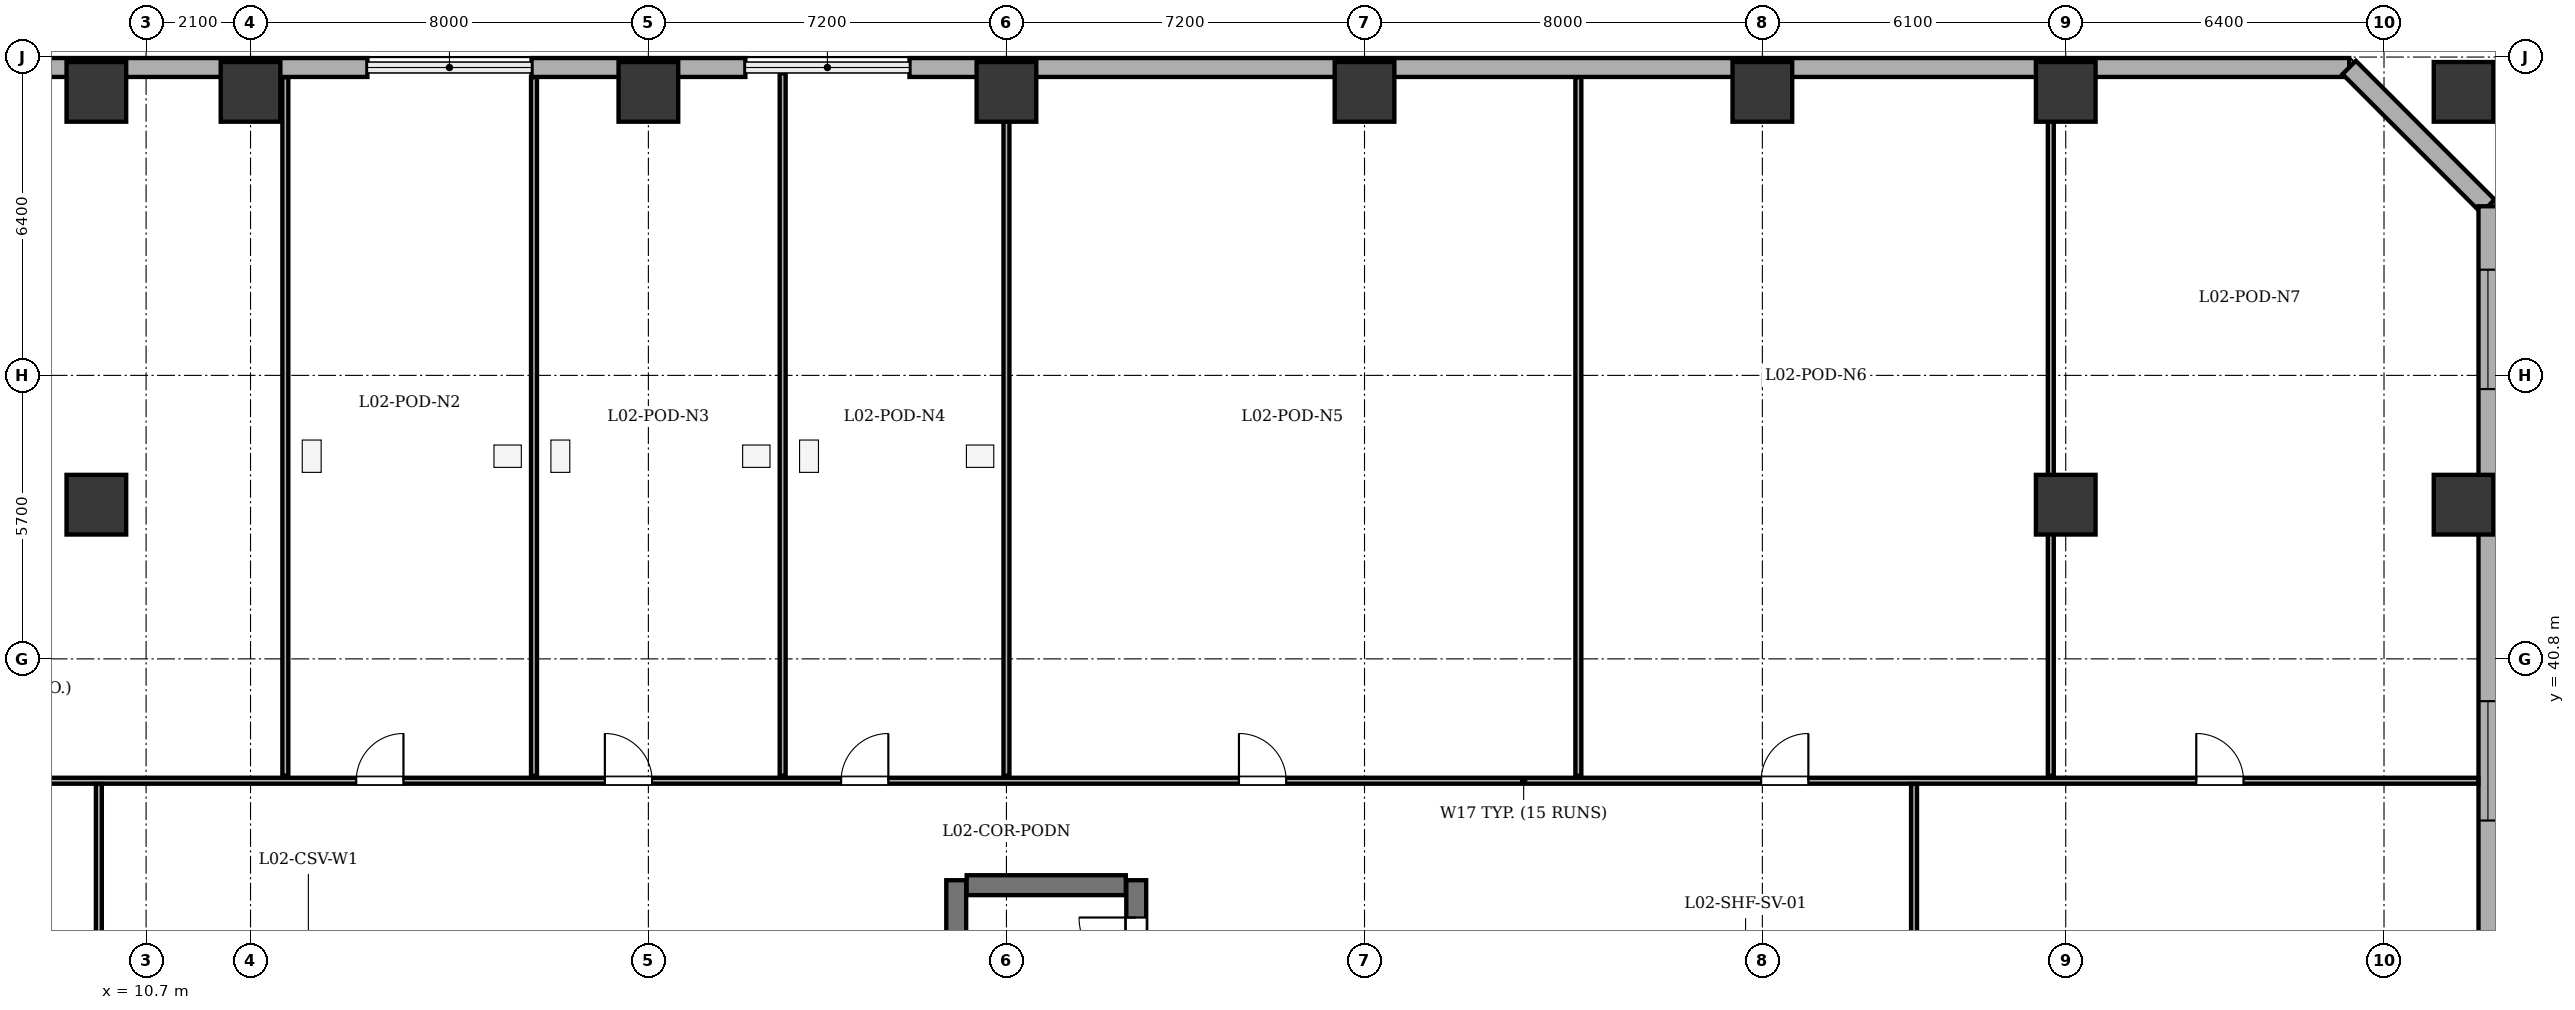
"""IFC4 building model, lengths in metres.
Left out: names, types, materials, properties, quantities, classifications, styles, units other than length and angle.
Written with IfcOpenShell. Run it as: python <this file> out.ifc"""

import sys

from ifc_helpers import new_model, si_unit, direction, frame, frame_2d, origin, origin_2d, place, context, subcontext, project, spatial, rectangle, extrude, element, fill, save


model = new_model("IFC4")
c1 = context("Model", 3, precision=1e-05, world=origin(), true_north=direction((0.0, 1.0)))
c2 = subcontext(c1, "Body", "Model", "MODEL_VIEW")
j1 = project(units=[si_unit("LENGTHUNIT", "METRE"), si_unit("PLANEANGLEUNIT", "RADIAN")], contexts=[c1])
p1 = place(None, origin())
s1 = spatial("IfcSite", under=j1, at=p1, CompositionType="ELEMENT")
p2 = place(p1, origin())
s2 = spatial("IfcBuilding", under=s1, at=p2, CompositionType="ELEMENT")
p3 = place(p2, frame((0.0, 0.0, 9.9)))
s3 = spatial("IfcBuildingStorey", under=s2, at=p3, CompositionType="ELEMENT", Elevation=9.9)
for number, where, z_axis, x_axis in (
    (1, (9.7, 52.2, 0.0), (0.0, 0.0, 1.0), (1.0, 0.0, 0.0)),
    (2, (12.8, 52.2, 0.0), (0.0, 0.0, 1.0), (1.0, 0.0, 0.0)),
    (3, (20.8, 52.2, 0.0), (0.0, 0.0, 1.0), (1.0, 0.0, 0.0)),
    (4, (28.0, 52.2, 0.0), (0.0, 0.0, 1.0), (1.0, 0.0, 0.0)),
    (5, (35.2, 52.2, 0.0), (0.0, 0.0, 1.0), (1.0, 0.0, 0.0)),
    (6, (43.2, 52.2, 0.0), (0.0, 0.0, 1.0), (1.0, 0.0, 0.0)),
    (7, (49.3, 52.2, 0.0), (0.0, 0.0, 1.0), (1.0, 0.0, 0.0)),
    (8, (57.3, 52.2, 0.0), (0.0, 0.0, 1.0), (1.0, 0.0, 0.0)),
    (9, (57.3, 43.9, 0.0), (0.0, 0.0, 1.0), (1.0, 0.0, 0.0)),
    (10, (9.7, 43.9, 0.0), (0.0, 0.0, 1.0), (1.0, 0.0, 0.0)),
    (11, (49.3, 43.9, 0.0), (0.0, 0.0, 1.0), (1.0, 0.0, 0.0)),
):
    element("IfcColumn", number, at=place(p3, frame(where, z_axis=z_axis, x_axis=x_axis)), inside=s3, PredefinedType="COLUMN", context=c2, shape_type="SweptSolid", body=[
        extrude(rectangle(XDim=1.2, YDim=1.2, at=origin_2d()), origin(), (0.0, 0.0, 1.0), 4.5),
    ])
p4 = place(p3, frame((5.4, 52.69, 0.0), z_axis=(0.0, 0.0, 1.0), x_axis=(1.0, 0.0, 0.0)))
e12 = element("IfcWall", 12, at=p4, inside=s3, PredefinedType="STANDARD", context=c2, shape_type="SweptSolid", body=[
    extrude(rectangle(XDim=9.75, YDim=0.38, at=frame_2d((4.875, 0.0))), origin(), (0.0, 0.0, 1.0), 4.18),
])
p5 = place(p3, frame((18.45, 52.69, 0.0), z_axis=(0.0, 0.0, 1.0), x_axis=(1.0, 0.0, 0.0)))
e13 = element("IfcWall", 13, at=p5, inside=s3, PredefinedType="STANDARD", context=c2, shape_type="SweptSolid", body=[
    extrude(rectangle(XDim=4.3, YDim=0.38, at=frame_2d((2.15, 0.0))), origin(), (0.0, 0.0, 1.0), 4.18),
])
p6 = place(p3, frame((26.05, 52.69, 0.0), z_axis=(0.0, 0.0, 1.0), x_axis=(1.0, 0.0, 0.0)))
e14 = element("IfcWall", 14, at=p6, inside=s3, PredefinedType="STANDARD", context=c2, shape_type="SweptSolid", body=[
    extrude(rectangle(XDim=28.95, YDim=0.38, at=frame_2d((14.475, 0.0))), origin(), (0.0, 0.0, 1.0), 4.18),
])
p7 = place(p3, frame((55.0, 52.69, 0.0), z_axis=(0.0, 0.0, 1.0), x_axis=(0.707106781187, -0.707106781187, 0.0)))
e15 = element("IfcWall", 15, at=p7, inside=s3, PredefinedType="STANDARD", context=c2, shape_type="SweptSolid", body=[
    extrude(rectangle(XDim=3.946, YDim=0.38, at=frame_2d((1.973, 0.0))), origin(), (0.0, 0.0, 1.0), 4.18),
])
p8 = place(p3, frame((57.79, 49.9, 0.0), z_axis=(0.0, 0.0, 1.0), x_axis=(0.0, -1.0, 0.0)))
e16 = element("IfcWall", 16, at=p8, inside=s3, PredefinedType="STANDARD", context=c2, shape_type="SweptSolid", body=[
    extrude(rectangle(XDim=45.4, YDim=0.38, at=frame_2d((22.7, 0.0))), origin(), (0.0, 0.0, 1.0), 4.18),
])
p9 = place(p8, frame((1.275, 0.0, 0.75)))
e17 = element("IfcOpeningElement", 17, at=p9, cuts=e16, PredefinedType="OPENING", context=c2, shape_type="SweptSolid", body=[
    extrude(rectangle(XDim=2.4, YDim=2.1, at=frame_2d((1.2, 1.05))), frame((0.0, 0.2, 0.0), z_axis=(0.0, -1.0, 0.0), x_axis=(1.0, 0.0, 0.0)), (0.0, 0.0, 1.0), 0.4),
])
p10 = place(p8, frame((9.95, 0.0, 0.75)))
e18 = element("IfcOpeningElement", 18, at=p10, cuts=e16, PredefinedType="OPENING", context=c2, shape_type="SweptSolid", body=[
    extrude(rectangle(XDim=2.4, YDim=2.1, at=frame_2d((1.2, 1.05))), frame((0.0, 0.2, 0.0), z_axis=(0.0, -1.0, 0.0), x_axis=(1.0, 0.0, 0.0)), (0.0, 0.0, 1.0), 0.4),
])
p11 = place(p8, frame((18.3, 0.0, 0.75)))
e19 = element("IfcOpeningElement", 19, at=p11, cuts=e16, PredefinedType="OPENING", context=c2, shape_type="SweptSolid", body=[
    extrude(rectangle(XDim=2.4, YDim=2.1, at=frame_2d((1.2, 1.05))), frame((0.0, 0.2, 0.0), z_axis=(0.0, -1.0, 0.0), x_axis=(1.0, 0.0, 0.0)), (0.0, 0.0, 1.0), 0.4),
])
p12 = place(p8, frame((24.7, 0.0, 0.75)))
e20 = element("IfcOpeningElement", 20, at=p12, cuts=e16, PredefinedType="OPENING", context=c2, shape_type="SweptSolid", body=[
    extrude(rectangle(XDim=2.4, YDim=2.1, at=frame_2d((1.2, 1.05))), frame((0.0, 0.2, 0.0), z_axis=(0.0, -1.0, 0.0), x_axis=(1.0, 0.0, 0.0)), (0.0, 0.0, 1.0), 0.4),
])
p13 = place(p8, frame((33.05, 0.0, 0.75)))
e21 = element("IfcOpeningElement", 21, at=p13, cuts=e16, PredefinedType="OPENING", context=c2, shape_type="SweptSolid", body=[
    extrude(rectangle(XDim=2.4, YDim=2.1, at=frame_2d((1.2, 1.05))), frame((0.0, 0.2, 0.0), z_axis=(0.0, -1.0, 0.0), x_axis=(1.0, 0.0, 0.0)), (0.0, 0.0, 1.0), 0.4),
])
p14 = place(p8, frame((41.725, 0.0, 0.75)))
e22 = element("IfcOpeningElement", 22, at=p14, cuts=e16, PredefinedType="OPENING", context=c2, shape_type="SweptSolid", body=[
    extrude(rectangle(XDim=2.4, YDim=2.1, at=frame_2d((1.2, 1.05))), frame((0.0, 0.2, 0.0), z_axis=(0.0, -1.0, 0.0), x_axis=(1.0, 0.0, 0.0)), (0.0, 0.0, 1.0), 0.4),
])
p15 = place(p3, frame((26.99, 28.75, 0.0), z_axis=(0.0, 0.0, 1.0), x_axis=(0.0, 1.0, 0.0)))
e23 = element("IfcWall", 23, at=p15, inside=s3, PredefinedType="SHEAR", context=c2, shape_type="SweptSolid", body=[
    extrude(rectangle(XDim=7.6, YDim=0.4, at=frame_2d((3.8, 0.0))), origin(), (0.0, 0.0, 1.0), 4.18),
])
p16 = place(p3, frame((30.61, 28.75, 0.0), z_axis=(0.0, 0.0, 1.0), x_axis=(0.0, 1.0, 0.0)))
e24 = element("IfcWall", 24, at=p16, inside=s3, PredefinedType="SHEAR", context=c2, shape_type="SweptSolid", body=[
    extrude(rectangle(XDim=7.6, YDim=0.4, at=frame_2d((3.8, 0.0))), origin(), (0.0, 0.0, 1.0), 4.18),
])
p17 = place(p16, frame((5.7, 0.0, 0.0)))
e25 = element("IfcOpeningElement", 25, at=p17, cuts=e24, PredefinedType="OPENING", context=c2, shape_type="SweptSolid", body=[
    extrude(rectangle(XDim=1.15, YDim=2.15, at=frame_2d((0.575, 1.075))), frame((0.0, 0.21, 0.0), z_axis=(0.0, -1.0, 0.0), x_axis=(1.0, 0.0, 0.0)), (0.0, 0.0, 1.0), 0.42),
])
p18 = place(p3, frame((27.2, 36.25, 0.0), z_axis=(0.0, 0.0, 1.0), x_axis=(1.0, 0.0, 0.0)))
e26 = element("IfcWall", 26, at=p18, inside=s3, PredefinedType="SHEAR", context=c2, shape_type="SweptSolid", body=[
    extrude(rectangle(XDim=3.2, YDim=0.4, at=frame_2d((1.6, 0.0))), origin(), (0.0, 0.0, 1.0), 4.18),
])
p19 = place(p3, frame((2.805, 38.35, 0.0), z_axis=(0.0, 0.0, 1.0), x_axis=(1.0, 0.0, 0.0)))
e27 = element("IfcWall", 27, at=p19, inside=s3, PredefinedType="PARTITIONING", context=c2, shape_type="SweptSolid", body=[
    extrude(rectangle(XDim=54.79, YDim=0.12, at=frame_2d((27.395, 0.0))), origin(), (0.0, 0.0, 1.0), 4.18),
])
p20 = place(p19, frame((4.57, 0.0, 0.0)))
e28 = element("IfcOpeningElement", 28, at=p20, cuts=e27, PredefinedType="OPENING", context=c2, shape_type="SweptSolid", body=[
    extrude(rectangle(XDim=0.95, YDim=2.1, at=frame_2d((0.475, 1.05))), frame((0.0, 0.07, 0.0), z_axis=(0.0, -1.0, 0.0), x_axis=(1.0, 0.0, 0.0)), (0.0, 0.0, 1.0), 0.14),
])
p21 = place(p19, frame((12.12, 0.0, 0.0)))
e29 = element("IfcOpeningElement", 29, at=p21, cuts=e27, PredefinedType="OPENING", context=c2, shape_type="SweptSolid", body=[
    extrude(rectangle(XDim=0.95, YDim=2.1, at=frame_2d((0.475, 1.05))), frame((0.0, 0.07, 0.0), z_axis=(0.0, -1.0, 0.0), x_axis=(1.0, 0.0, 0.0)), (0.0, 0.0, 1.0), 0.14),
])
p22 = place(p19, frame((17.12, 0.0, 0.0)))
e30 = element("IfcOpeningElement", 30, at=p22, cuts=e27, PredefinedType="OPENING", context=c2, shape_type="SweptSolid", body=[
    extrude(rectangle(XDim=0.95, YDim=2.1, at=frame_2d((0.475, 1.05))), frame((0.0, 0.07, 0.0), z_axis=(0.0, -1.0, 0.0), x_axis=(1.0, 0.0, 0.0)), (0.0, 0.0, 1.0), 0.14),
])
p23 = place(p19, frame((21.87, 0.0, 0.0)))
e31 = element("IfcOpeningElement", 31, at=p23, cuts=e27, PredefinedType="OPENING", context=c2, shape_type="SweptSolid", body=[
    extrude(rectangle(XDim=0.95, YDim=2.1, at=frame_2d((0.475, 1.05))), frame((0.0, 0.07, 0.0), z_axis=(0.0, -1.0, 0.0), x_axis=(1.0, 0.0, 0.0)), (0.0, 0.0, 1.0), 0.14),
])
p24 = place(p19, frame((29.87, 0.0, 0.0)))
e32 = element("IfcOpeningElement", 32, at=p24, cuts=e27, PredefinedType="OPENING", context=c2, shape_type="SweptSolid", body=[
    extrude(rectangle(XDim=0.95, YDim=2.1, at=frame_2d((0.475, 1.05))), frame((0.0, 0.07, 0.0), z_axis=(0.0, -1.0, 0.0), x_axis=(1.0, 0.0, 0.0)), (0.0, 0.0, 1.0), 0.14),
])
p25 = place(p19, frame((40.37, 0.0, 0.0)))
e33 = element("IfcOpeningElement", 33, at=p25, cuts=e27, PredefinedType="OPENING", context=c2, shape_type="SweptSolid", body=[
    extrude(rectangle(XDim=0.95, YDim=2.1, at=frame_2d((0.475, 1.05))), frame((0.0, 0.07, 0.0), z_axis=(0.0, -1.0, 0.0), x_axis=(1.0, 0.0, 0.0)), (0.0, 0.0, 1.0), 0.14),
])
p26 = place(p19, frame((49.12, 0.0, 0.0)))
e34 = element("IfcOpeningElement", 34, at=p26, cuts=e27, PredefinedType="OPENING", context=c2, shape_type="SweptSolid", body=[
    extrude(rectangle(XDim=0.95, YDim=2.1, at=frame_2d((0.475, 1.05))), frame((0.0, 0.07, 0.0), z_axis=(0.0, -1.0, 0.0), x_axis=(1.0, 0.0, 0.0)), (0.0, 0.0, 1.0), 0.14),
])
for number, where, z_axis, x_axis in (
    (35, (13.5, 38.45, 0.0), (0.0, 0.0, 1.0), (0.0, 1.0, 0.0)),
    (36, (18.5, 38.45, 0.0), (0.0, 0.0, 1.0), (0.0, 1.0, 0.0)),
):
    element("IfcWall", number, at=place(p3, frame(where, z_axis=z_axis, x_axis=x_axis)), inside=s3, PredefinedType="PARTITIONING", context=c2, shape_type="SweptSolid", body=[
        extrude(rectangle(XDim=14.045, YDim=0.12, at=frame_2d((7.022, 0.0))), origin(), (0.0, 0.0, 1.0), 4.18),
    ])
p27 = place(p3, frame((23.5, 38.45, 0.0), z_axis=(0.0, 0.0, 1.0), x_axis=(0.0, 1.0, 0.0)))
e37 = element("IfcWall", 37, at=p27, inside=s3, PredefinedType="PARTITIONING", context=c2, shape_type="SweptSolid", body=[
    extrude(rectangle(XDim=14.125, YDim=0.12, at=frame_2d((7.062, 0.0))), origin(), (0.0, 0.0, 1.0), 4.18),
])
for number, where, z_axis, x_axis in (
    (38, (28.0, 38.45, 0.0), (0.0, 0.0, 1.0), (0.0, 1.0, 0.0)),
    (39, (39.5, 38.45, 0.0), (0.0, 0.0, 1.0), (0.0, 1.0, 0.0)),
):
    element("IfcWall", number, at=place(p3, frame(where, z_axis=z_axis, x_axis=x_axis)), inside=s3, PredefinedType="PARTITIONING", context=c2, shape_type="SweptSolid", body=[
        extrude(rectangle(XDim=14.045, YDim=0.12, at=frame_2d((7.022, 0.0))), origin(), (0.0, 0.0, 1.0), 4.18),
    ])
p28 = place(p3, frame((49.0, 38.45, 0.0), z_axis=(0.0, 0.0, 1.0), x_axis=(0.0, 1.0, 0.0)))
e40 = element("IfcWall", 40, at=p28, inside=s3, PredefinedType="PARTITIONING", context=c2, shape_type="SweptSolid", body=[
    extrude(rectangle(XDim=14.045, YDim=0.12, at=frame_2d((7.022, 0.0))), origin(), (0.0, 0.0, 1.0), 3.065),
])
p29 = place(p3, frame((9.75, 18.565, 0.0), z_axis=(0.0, 0.0, 1.0), x_axis=(0.0, 1.0, 0.0)))
e41 = element("IfcWall", 41, at=p29, inside=s3, PredefinedType="PARTITIONING", context=c2, shape_type="SweptSolid", body=[
    extrude(rectangle(XDim=19.72, YDim=0.12, at=frame_2d((9.86, 0.0))), origin(), (0.0, 0.0, 1.0), 3.065),
])
p30 = place(p29, frame((7.985, 0.0, 0.0)))
e42 = element("IfcOpeningElement", 42, at=p30, cuts=e41, PredefinedType="OPENING", context=c2, shape_type="SweptSolid", body=[
    extrude(rectangle(XDim=1.0, YDim=2.1, at=frame_2d((0.5, 1.05))), frame((0.0, 0.07, 0.0), z_axis=(0.0, -1.0, 0.0), x_axis=(1.0, 0.0, 0.0)), (0.0, 0.0, 1.0), 0.14),
])
p31 = place(p3, frame((46.25, 18.565, 0.0), z_axis=(0.0, 0.0, 1.0), x_axis=(0.0, 1.0, 0.0)))
e43 = element("IfcWall", 43, at=p31, inside=s3, PredefinedType="PARTITIONING", context=c2, shape_type="SweptSolid", body=[
    extrude(rectangle(XDim=19.72, YDim=0.12, at=frame_2d((9.86, 0.0))), origin(), (0.0, 0.0, 1.0), 4.18),
])
p32 = place(p31, frame((7.985, 0.0, 0.0)))
e44 = element("IfcOpeningElement", 44, at=p32, cuts=e43, PredefinedType="OPENING", context=c2, shape_type="SweptSolid", body=[
    extrude(rectangle(XDim=1.0, YDim=2.1, at=frame_2d((0.5, 1.05))), frame((0.0, 0.07, 0.0), z_axis=(0.0, -1.0, 0.0), x_axis=(1.0, 0.0, 0.0)), (0.0, 0.0, 1.0), 0.14),
])
p33 = place(p9, origin())
e45 = element("IfcWindow", 45, at=p33, inside=s3, PartitioningType="SINGLE_PANEL", PredefinedType="WINDOW", context=c2, shape_type="SweptSolid", body=[
    extrude(rectangle(XDim=2.4, YDim=2.1, at=frame_2d((1.2, 1.05))), frame((0.0, 0.03, 0.0), z_axis=(0.0, -1.0, 0.0), x_axis=(1.0, 0.0, 0.0)), (0.0, 0.0, 1.0), 0.06),
])
fill(e17, e45)
p34 = place(p10, origin())
e46 = element("IfcWindow", 46, at=p34, inside=s3, PartitioningType="SINGLE_PANEL", PredefinedType="WINDOW", context=c2, shape_type="SweptSolid", body=[
    extrude(rectangle(XDim=2.4, YDim=2.1, at=frame_2d((1.2, 1.05))), frame((0.0, 0.03, 0.0), z_axis=(0.0, -1.0, 0.0), x_axis=(1.0, 0.0, 0.0)), (0.0, 0.0, 1.0), 0.06),
])
fill(e18, e46)
p35 = place(p17, origin())
e47 = element("IfcDoor", 47, at=p35, inside=s3, OperationType="SINGLE_SWING_RIGHT", PredefinedType="DOOR", context=c2, shape_type="SweptSolid", body=[
    extrude(rectangle(XDim=1.15, YDim=2.15, at=frame_2d((0.575, 1.075))), frame((0.0, 0.025, 0.0), z_axis=(0.0, -1.0, 0.0), x_axis=(1.0, 0.0, 0.0)), (0.0, 0.0, 1.0), 0.05),
])
fill(e25, e47)
p36 = place(p21, origin())
e48 = element("IfcDoor", 48, at=p36, inside=s3, OperationType="SINGLE_SWING_RIGHT", PredefinedType="DOOR", context=c2, shape_type="SweptSolid", body=[
    extrude(rectangle(XDim=0.95, YDim=2.1, at=frame_2d((0.475, 1.05))), frame((0.0, 0.025, 0.0), z_axis=(0.0, -1.0, 0.0), x_axis=(1.0, 0.0, 0.0)), (0.0, 0.0, 1.0), 0.05),
])
fill(e29, e48)
p37 = place(p22, origin())
e49 = element("IfcDoor", 49, at=p37, inside=s3, OperationType="SINGLE_SWING_LEFT", PredefinedType="DOOR", context=c2, shape_type="SweptSolid", body=[
    extrude(rectangle(XDim=0.95, YDim=2.1, at=frame_2d((0.475, 1.05))), frame((0.0, 0.025, 0.0), z_axis=(0.0, -1.0, 0.0), x_axis=(1.0, 0.0, 0.0)), (0.0, 0.0, 1.0), 0.05),
])
fill(e30, e49)
p38 = place(p23, origin())
e50 = element("IfcDoor", 50, at=p38, inside=s3, OperationType="SINGLE_SWING_RIGHT", PredefinedType="DOOR", context=c2, shape_type="SweptSolid", body=[
    extrude(rectangle(XDim=0.95, YDim=2.1, at=frame_2d((0.475, 1.05))), frame((0.0, 0.025, 0.0), z_axis=(0.0, -1.0, 0.0), x_axis=(1.0, 0.0, 0.0)), (0.0, 0.0, 1.0), 0.05),
])
fill(e31, e50)
p39 = place(p24, origin())
e51 = element("IfcDoor", 51, at=p39, inside=s3, OperationType="SINGLE_SWING_LEFT", PredefinedType="DOOR", context=c2, shape_type="SweptSolid", body=[
    extrude(rectangle(XDim=0.95, YDim=2.1, at=frame_2d((0.475, 1.05))), frame((0.0, 0.025, 0.0), z_axis=(0.0, -1.0, 0.0), x_axis=(1.0, 0.0, 0.0)), (0.0, 0.0, 1.0), 0.05),
])
fill(e32, e51)
p40 = place(p25, origin())
e52 = element("IfcDoor", 52, at=p40, inside=s3, OperationType="SINGLE_SWING_RIGHT", PredefinedType="DOOR", context=c2, shape_type="SweptSolid", body=[
    extrude(rectangle(XDim=0.95, YDim=2.1, at=frame_2d((0.475, 1.05))), frame((0.0, 0.025, 0.0), z_axis=(0.0, -1.0, 0.0), x_axis=(1.0, 0.0, 0.0)), (0.0, 0.0, 1.0), 0.05),
])
fill(e33, e52)
p41 = place(p26, origin())
e53 = element("IfcDoor", 53, at=p41, inside=s3, OperationType="SINGLE_SWING_LEFT", PredefinedType="DOOR", context=c2, shape_type="SweptSolid", body=[
    extrude(rectangle(XDim=0.95, YDim=2.1, at=frame_2d((0.475, 1.05))), frame((0.0, 0.025, 0.0), z_axis=(0.0, -1.0, 0.0), x_axis=(1.0, 0.0, 0.0)), (0.0, 0.0, 1.0), 0.05),
])
fill(e34, e53)
save(model, sys.argv[1])
